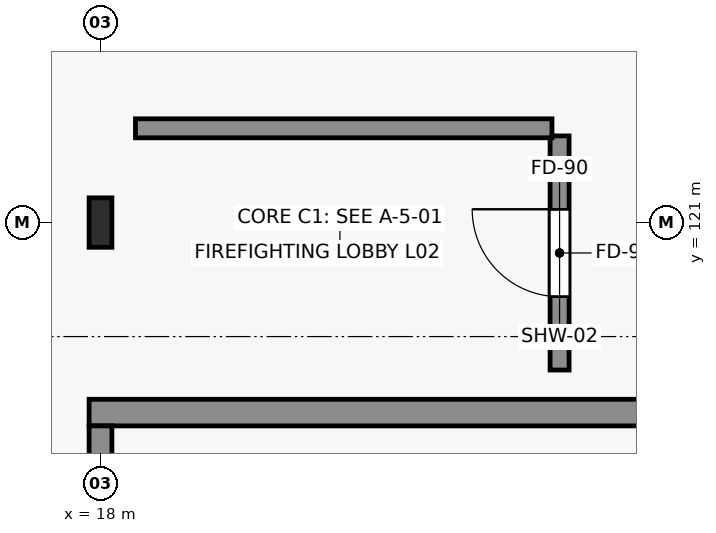
"""IFC4 building model, lengths in metres.
Left out: names, types, materials, properties, quantities, classifications, styles, units other than length and angle.
Written with IfcOpenShell. Run it as: python <this file> out.ifc"""

import sys

from ifc_helpers import new_model, si_unit, direction, frame, frame_2d, origin, origin_2d, place, context, subcontext, project, spatial, rectangle, i_section, extrude, element, fill, save


model = new_model("IFC4")
c1 = context("Model", 3, precision=1e-05, world=origin(), true_north=direction((0.0, 1.0)))
c2 = subcontext(c1, "Body", "Model", "MODEL_VIEW")
j1 = project(units=[si_unit("LENGTHUNIT", "METRE"), si_unit("PLANEANGLEUNIT", "RADIAN")], contexts=[c1])
p1 = place(None, origin())
s1 = spatial("IfcSite", under=j1, at=p1, CompositionType="ELEMENT")
p2 = place(p1, origin())
s2 = spatial("IfcBuilding", under=s1, at=p2, CompositionType="ELEMENT")
p3 = place(p2, frame((0.0, 0.0, 9.8)))
s3 = spatial("IfcBuildingStorey", under=s2, at=p3, CompositionType="ELEMENT", Elevation=9.8)
p4 = place(p3, frame((18.0, 121.0, 0.0), z_axis=(0.0, 0.0, 1.0), x_axis=(1.0, 0.0, 0.0)))
e1 = element("IfcColumn", 1, at=p4, inside=s3, PredefinedType="COLUMN", context=c2, shape_type="SweptSolid", body=[
    extrude(i_section(OverallWidth=0.3, OverallDepth=0.65, WebThickness=0.016, FlangeThickness=0.031, FilletRadius=0.027, at=origin_2d()), origin(), (0.0, 0.0, 1.0), 5.0),
])
p5 = place(p3, frame((17.85, 118.5, 0.0), z_axis=(0.0, 0.0, 1.0), x_axis=(1.0, 0.0, 0.0)))
e2 = element("IfcWall", 2, at=p5, inside=s3, PredefinedType="SHEAR", context=c2, shape_type="SweptSolid", body=[
    extrude(rectangle(XDim=9.3, YDim=0.35, at=frame_2d((4.65, 0.0))), origin(), (0.0, 0.0, 1.0), 5.0),
])
p6 = place(p3, frame((18.0, 113.5, 0.0), z_axis=(0.0, 0.0, 1.0), x_axis=(0.0, 1.0, 0.0)))
e3 = element("IfcWall", 3, at=p6, inside=s3, PredefinedType="SHEAR", context=c2, shape_type="SweptSolid", body=[
    extrude(rectangle(XDim=4.825, YDim=0.3, at=frame_2d((2.413, 0.0))), origin(), (0.0, 0.0, 1.0), 5.0),
])
p7 = place(p3, frame((24.04, 119.06, 0.0), z_axis=(0.0, 0.0, 1.0), x_axis=(0.0, 1.0, 0.0)))
e4 = element("IfcWall", 4, at=p7, inside=s3, PredefinedType="SOLIDWALL", context=c2, shape_type="SweptSolid", body=[
    extrude(rectangle(XDim=3.08, YDim=0.25, at=frame_2d((1.54, 0.0))), origin(), (0.0, 0.0, 1.0), 4.53),
])
p8 = place(p7, frame((0.965, 0.0, 0.0)))
e5 = element("IfcOpeningElement", 5, at=p8, cuts=e4, PredefinedType="OPENING", context=c2, shape_type="SweptSolid", body=[
    extrude(rectangle(XDim=1.15, YDim=2.2, at=frame_2d((0.575, 1.1))), frame((0.0, 0.135, 0.0), z_axis=(0.0, -1.0, 0.0), x_axis=(1.0, 0.0, 0.0)), (0.0, 0.0, 1.0), 0.27),
])
p9 = place(p3, frame((18.46, 122.24, 0.0), z_axis=(0.0, 0.0, 1.0), x_axis=(1.0, 0.0, 0.0)))
e6 = element("IfcWall", 6, at=p9, inside=s3, PredefinedType="SOLIDWALL", context=c2, shape_type="SweptSolid", body=[
    extrude(rectangle(XDim=5.48, YDim=0.25, at=frame_2d((2.74, 0.0))), origin(), (0.0, 0.0, 1.0), 4.73),
])
p10 = place(p8, origin())
e7 = element("IfcDoor", 7, at=p10, inside=s3, OperationType="SINGLE_SWING_RIGHT", PredefinedType="DOOR", context=c2, shape_type="SweptSolid", body=[
    extrude(rectangle(XDim=1.15, YDim=2.2, at=frame_2d((0.575, 1.1))), frame((0.0, 0.025, 0.0), z_axis=(0.0, -1.0, 0.0), x_axis=(1.0, 0.0, 0.0)), (0.0, 0.0, 1.0), 0.05),
])
fill(e5, e7)
save(model, sys.argv[1])
